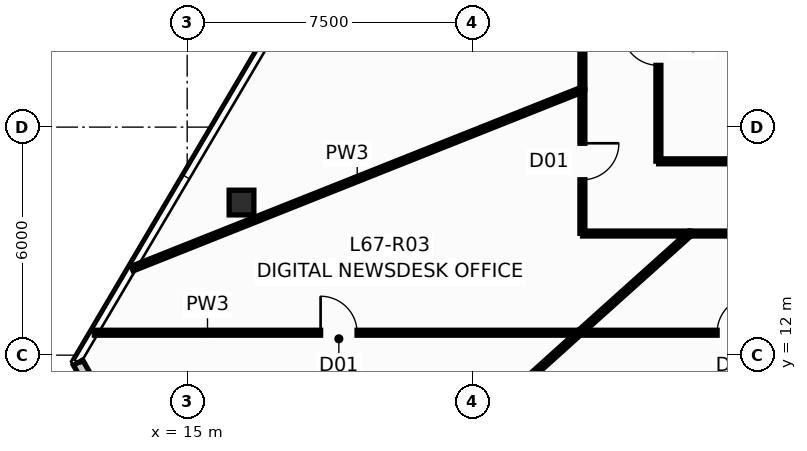
"""IFC4 building model, lengths in metres.
Left out: names, types, materials, properties, quantities, classifications, styles, units other than length and angle.
Written with IfcOpenShell. Run it as: python <this file> out.ifc"""

import sys

from ifc_helpers import new_model, si_unit, direction, frame, frame_2d, origin, origin_2d, place, context, subcontext, project, spatial, rectangle, hollow_rectangle, extrude, source, transform, mapped, element, fill, save


model = new_model("IFC4")
c1 = context("Model", 3, precision=1e-05, world=origin(), true_north=direction((0.0, 1.0)))
c2 = subcontext(c1, "Body", "Model", "MODEL_VIEW")
j1 = project(units=[si_unit("LENGTHUNIT", "METRE"), si_unit("PLANEANGLEUNIT", "RADIAN")], contexts=[c1])
p1 = place(None, origin())
s1 = spatial("IfcSite", under=j1, at=p1, CompositionType="ELEMENT")
p2 = place(p1, origin())
s2 = spatial("IfcBuilding", under=s1, at=p2, CompositionType="ELEMENT")
p3 = place(p2, frame((0.0, 0.0, 255.4)))
s3 = spatial("IfcBuildingStorey", under=s2, at=p3, CompositionType="ELEMENT", Elevation=255.4)
m1 = source(origin(), c2, "Body", "SweptSolid", [
    extrude(hollow_rectangle(XDim=0.65, YDim=0.65, WallThickness=0.04, at=origin_2d()), origin(), (0.0, 0.0, 1.0), 3.651),
])
p4 = place(p3, frame((16.43, 16.015, 0.0), z_axis=(0.010431098089, -0.021530856313, 0.999713766245), x_axis=(0.899947055326, 0.435999194506, 0.0)))
e1 = element("IfcColumn", 1, at=p4, inside=s3, PredefinedType="COLUMN", context=c2, shape_type="MappedRepresentation", body=[
    mapped(m1, transform((0.0, 0.0, 0.0), scale=1.0)),
])
p5 = place(p3, frame((14.389, 7.763, 0.0), z_axis=(0.0, 0.0, 1.0), x_axis=(-0.488121543329, 0.87277566358, 0.0)))
e2 = element("IfcWall", 2, at=p5, inside=s3, PredefinedType="STANDARD", context=c2, shape_type="SweptSolid", body=[
    extrude(rectangle(XDim=4.629, YDim=0.28, at=frame_2d((2.315, 0.0))), origin(), (0.0, 0.0, 1.0), 3.4),
])
p6 = place(p5, frame((1.71, 0.0, 0.9)))
e3 = element("IfcOpeningElement", 3, at=p6, cuts=e2, PredefinedType="OPENING", context=c2, shape_type="SweptSolid", body=[
    extrude(rectangle(XDim=1.2, YDim=1.65, at=frame_2d((0.6, 0.825))), frame((0.0, 0.152, 0.0), z_axis=(0.0, -1.0, 0.0), x_axis=(1.0, 0.0, 0.0)), (0.0, 0.0, 1.0), 0.304),
])
p7 = place(p3, frame((13.554, 14.277, 0.0), z_axis=(0.0, 0.0, 1.0), x_axis=(0.929168727435, 0.369655888574, 0.0)))
e4 = element("IfcWall", 4, at=p7, inside=s3, PredefinedType="PARTITIONING", context=c2, shape_type="SweptSolid", body=[
    extrude(rectangle(XDim=12.743, YDim=0.13, at=frame_2d((6.372, 0.0))), origin(), (0.0, 0.0, 1.0), 2.985),
])
p8 = place(p3, frame((12.558, 12.59, 0.0), z_axis=(0.0, 0.0, 1.0), x_axis=(1.0, 0.0, 0.0)))
e5 = element("IfcWall", 5, at=p8, inside=s3, PredefinedType="PARTITIONING", context=c2, shape_type="SweptSolid", body=[
    extrude(rectangle(XDim=12.757, YDim=0.13, at=frame_2d((6.378, 0.0))), origin(), (0.0, 0.0, 1.0), 3.085),
])
p9 = place(p8, frame((5.953, 0.0, 0.0)))
e6 = element("IfcOpeningElement", 6, at=p9, cuts=e5, PredefinedType="OPENING", context=c2, shape_type="SweptSolid", body=[
    extrude(rectangle(XDim=0.96, YDim=2.15, at=frame_2d((0.48, 1.075))), frame((0.0, 0.077, 0.0), z_axis=(0.0, -1.0, 0.0), x_axis=(1.0, 0.0, 0.0)), (0.0, 0.0, 1.0), 0.154),
])
p10 = place(p3, frame((25.325, 12.59, 0.0), z_axis=(0.0, 0.0, 1.0), x_axis=(1.0, 0.0, 0.0)))
e7 = element("IfcWall", 7, at=p10, inside=s3, PredefinedType="PARTITIONING", context=c2, shape_type="SweptSolid", body=[
    extrude(rectangle(XDim=8.2, YDim=0.13, at=frame_2d((4.1, 0.0))), origin(), (0.0, 0.0, 1.0), 3.085),
])
p11 = place(p10, frame((3.62, 0.0, 0.0)))
e8 = element("IfcOpeningElement", 8, at=p11, cuts=e7, PredefinedType="OPENING", context=c2, shape_type="SweptSolid", body=[
    extrude(rectangle(XDim=0.96, YDim=2.15, at=frame_2d((0.48, 1.075))), frame((0.0, 0.077, 0.0), z_axis=(0.0, -1.0, 0.0), x_axis=(1.0, 0.0, 0.0)), (0.0, 0.0, 1.0), 0.154),
])
p12 = place(p3, frame((25.4, 18.995, 0.0), z_axis=(0.0, 0.0, 1.0), x_axis=(0.0, 1.0, 0.0)))
e9 = element("IfcWall", 9, at=p12, inside=s3, PredefinedType="PARTITIONING", context=c2, shape_type="SweptSolid", body=[
    extrude(rectangle(XDim=7.5, YDim=0.13, at=frame_2d((3.75, 0.0))), origin(), (0.0, 0.0, 1.0), 3.085),
])
p13 = place(p12, frame((3.27, 0.0, 0.0)))
e10 = element("IfcOpeningElement", 10, at=p13, cuts=e9, PredefinedType="OPENING", context=c2, shape_type="SweptSolid", body=[
    extrude(rectangle(XDim=0.96, YDim=2.15, at=frame_2d((0.48, 1.075))), frame((0.0, 0.077, 0.0), z_axis=(0.0, -1.0, 0.0), x_axis=(1.0, 0.0, 0.0)), (0.0, 0.0, 1.0), 0.154),
])
p14 = place(p3, frame((20.077, 7.866, 0.0), z_axis=(0.0, 0.0, 1.0), x_axis=(0.742915326352, 0.669385403091, 0.0)))
e11 = element("IfcWall", 11, at=p14, inside=s3, PredefinedType="PARTITIONING", context=c2, shape_type="SweptSolid", body=[
    extrude(rectangle(XDim=7.052, YDim=0.13, at=frame_2d((3.526, 0.0))), origin(), (0.0, 0.0, 1.0), 3.4),
])
p15 = place(p3, frame((28.235, 15.2, 0.0), z_axis=(0.0, 0.0, 1.0), x_axis=(1.0, 0.0, 0.0)))
e12 = element("IfcWall", 12, at=p15, inside=s3, PredefinedType="PARTITIONING", context=c2, shape_type="SweptSolid", body=[
    extrude(rectangle(XDim=6.31, YDim=0.13, at=frame_2d((3.155, 0.0))), origin(), (0.0, 0.0, 1.0), 3.085),
])
p16 = place(p15, frame((2.675, 0.0, 0.0)))
e13 = element("IfcOpeningElement", 13, at=p16, cuts=e12, PredefinedType="OPENING", context=c2, shape_type="SweptSolid", body=[
    extrude(rectangle(XDim=0.96, YDim=2.15, at=frame_2d((0.48, 1.075))), frame((0.0, 0.077, 0.0), z_axis=(0.0, -1.0, 0.0), x_axis=(1.0, 0.0, 0.0)), (0.0, 0.0, 1.0), 0.154),
])
p17 = place(p3, frame((27.4, 17.105, 0.0), z_axis=(0.0, 0.0, 1.0), x_axis=(0.0, 1.0, 0.0)))
e14 = element("IfcWall", 14, at=p17, inside=s3, PredefinedType="PARTITIONING", context=c2, shape_type="SweptSolid", body=[
    extrude(rectangle(XDim=6.0, YDim=0.13, at=frame_2d((3.0, 0.0))), origin(), (0.0, 0.0, 1.0), 3.085),
])
p18 = place(p17, frame((2.52, 0.0, 0.0)))
e15 = element("IfcOpeningElement", 15, at=p18, cuts=e14, PredefinedType="OPENING", context=c2, shape_type="SweptSolid", body=[
    extrude(rectangle(XDim=0.96, YDim=2.15, at=frame_2d((0.48, 1.075))), frame((0.0, 0.077, 0.0), z_axis=(0.0, -1.0, 0.0), x_axis=(1.0, 0.0, 0.0)), (0.0, 0.0, 1.0), 0.154),
])
p19 = place(p3, frame((25.324, 12.593, 0.0), z_axis=(0.0, 0.0, 1.0), x_axis=(0.744298944204, 0.667846600393, 0.0)))
e16 = element("IfcWall", 16, at=p19, inside=s3, PredefinedType="PARTITIONING", context=c2, shape_type="SweptSolid", body=[
    extrude(rectangle(XDim=3.899, YDim=0.13, at=frame_2d((1.95, 0.0))), origin(), (0.0, 0.0, 1.0), 2.985),
])
p20 = place(p3, frame((25.4, 18.985, 0.0), z_axis=(0.0, 0.0, 1.0), x_axis=(0.0, -1.0, 0.0)))
e17 = element("IfcWall", 17, at=p20, inside=s3, PredefinedType="PARTITIONING", context=c2, shape_type="SweptSolid", body=[
    extrude(rectangle(XDim=3.78, YDim=0.13, at=frame_2d((1.89, 0.0))), origin(), (0.0, 0.0, 1.0), 3.085),
])
p21 = place(p20, frame((1.41, 0.0, 0.0)))
e18 = element("IfcOpeningElement", 18, at=p21, cuts=e17, PredefinedType="OPENING", context=c2, shape_type="SweptSolid", body=[
    extrude(rectangle(XDim=0.96, YDim=2.15, at=frame_2d((0.48, 1.075))), frame((0.0, 0.077, 0.0), z_axis=(0.0, -1.0, 0.0), x_axis=(1.0, 0.0, 0.0)), (0.0, 0.0, 1.0), 0.154),
])
p22 = place(p3, frame((30.265, 17.1, 0.0), z_axis=(0.0, 0.0, 1.0), x_axis=(-1.0, 0.0, 0.0)))
e19 = element("IfcWall", 19, at=p22, inside=s3, PredefinedType="PARTITIONING", context=c2, shape_type="SweptSolid", body=[
    extrude(rectangle(XDim=2.86, YDim=0.13, at=frame_2d((1.43, 0.0))), origin(), (0.0, 0.0, 1.0), 2.985),
])
p23 = place(p3, frame((25.405, 15.2, 0.0), z_axis=(0.0, 0.0, 1.0), x_axis=(1.0, 0.0, 0.0)))
e20 = element("IfcWall", 20, at=p23, inside=s3, PredefinedType="PARTITIONING", context=c2, shape_type="SweptSolid", body=[
    extrude(rectangle(XDim=2.82, YDim=0.13, at=frame_2d((1.41, 0.0))), origin(), (0.0, 0.0, 1.0), 3.085),
])
p24 = place(p9, origin())
e21 = element("IfcDoor", 21, at=p24, inside=s3, OperationType="SINGLE_SWING_LEFT", PredefinedType="DOOR", context=c2, shape_type="SweptSolid", body=[
    extrude(rectangle(XDim=0.96, YDim=2.15, at=frame_2d((0.48, 1.075))), frame((0.0, 0.025, 0.0), z_axis=(0.0, -1.0, 0.0), x_axis=(1.0, 0.0, 0.0)), (0.0, 0.0, 1.0), 0.05),
])
fill(e6, e21)
p25 = place(p11, origin())
e22 = element("IfcDoor", 22, at=p25, inside=s3, OperationType="SINGLE_SWING_RIGHT", PredefinedType="DOOR", context=c2, shape_type="SweptSolid", body=[
    extrude(rectangle(XDim=0.96, YDim=2.15, at=frame_2d((0.48, 1.075))), frame((0.0, 0.025, 0.0), z_axis=(0.0, -1.0, 0.0), x_axis=(1.0, 0.0, 0.0)), (0.0, 0.0, 1.0), 0.05),
])
fill(e8, e22)
p26 = place(p18, origin())
e23 = element("IfcDoor", 23, at=p26, inside=s3, OperationType="SINGLE_SWING_RIGHT", PredefinedType="DOOR", context=c2, shape_type="SweptSolid", body=[
    extrude(rectangle(XDim=0.96, YDim=2.15, at=frame_2d((0.48, 1.075))), frame((0.0, 0.025, 0.0), z_axis=(0.0, -1.0, 0.0), x_axis=(1.0, 0.0, 0.0)), (0.0, 0.0, 1.0), 0.05),
])
fill(e15, e23)
p27 = place(p21, origin())
e24 = element("IfcDoor", 24, at=p27, inside=s3, OperationType="SINGLE_SWING_LEFT", PredefinedType="DOOR", context=c2, shape_type="SweptSolid", body=[
    extrude(rectangle(XDim=0.96, YDim=2.15, at=frame_2d((0.48, 1.075))), frame((0.0, 0.025, 0.0), z_axis=(0.0, -1.0, 0.0), x_axis=(1.0, 0.0, 0.0)), (0.0, 0.0, 1.0), 0.05),
])
fill(e18, e24)
save(model, sys.argv[1])
